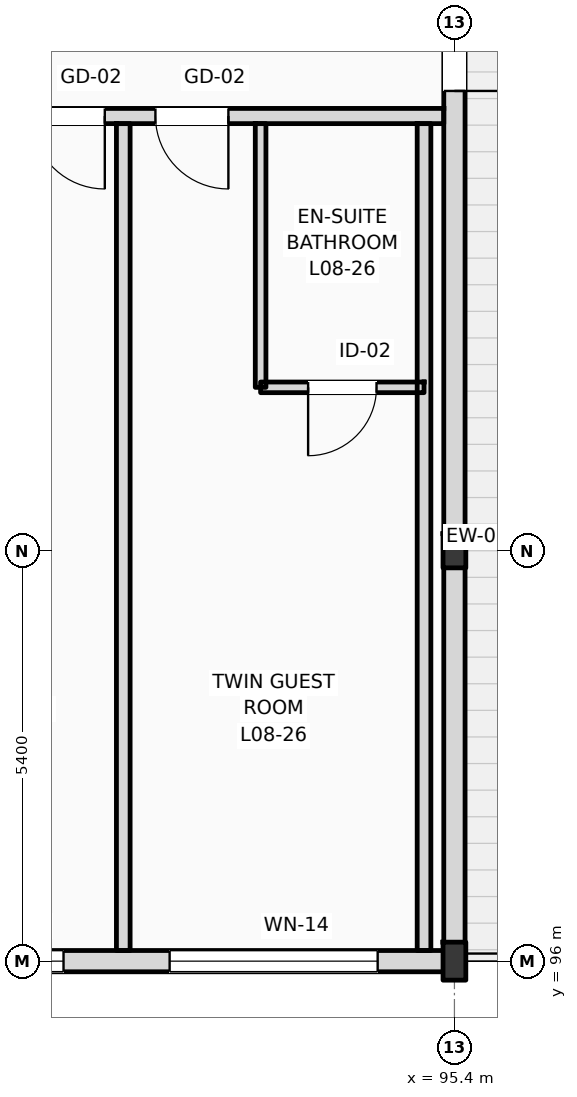
"""IFC4 building model, lengths in metres.
Left out: names, types, materials, properties, quantities, classifications, styles, units other than length and angle.
Written with IfcOpenShell. Run it as: python <this file> out.ifc"""

import sys

from ifc_helpers import new_model, si_unit, direction, frame, frame_2d, origin, origin_2d, place, context, subcontext, project, spatial, rectangle, i_section, extrude, element, fill, save


model = new_model("IFC4")
c1 = context("Model", 3, precision=1e-05, world=origin(), true_north=direction((0.0, 1.0)))
c2 = subcontext(c1, "Body", "Model", "MODEL_VIEW")
j1 = project(units=[si_unit("LENGTHUNIT", "METRE"), si_unit("PLANEANGLEUNIT", "RADIAN")], contexts=[c1])
p1 = place(None, origin())
s1 = spatial("IfcSite", under=j1, at=p1, CompositionType="ELEMENT")
p2 = place(p1, origin())
s2 = spatial("IfcBuilding", under=s1, at=p2, CompositionType="ELEMENT")
p3 = place(p2, frame((0.0, 0.0, 35.4)))
s3 = spatial("IfcBuildingStorey", under=s2, at=p3, CompositionType="ELEMENT", Elevation=35.4)
p4 = place(p3, frame((95.4, 96.0, 0.0), z_axis=(0.0, 0.0, 1.0), x_axis=(1.0, 0.0, 0.0)))
e1 = element("IfcColumn", 1, at=p4, inside=s3, PredefinedType="COLUMN", context=c2, shape_type="SweptSolid", body=[
    extrude(i_section(OverallWidth=0.3, OverallDepth=0.5, WebThickness=0.014, FlangeThickness=0.028, FilletRadius=0.027, at=origin_2d()), origin(), (0.0, 0.0, 1.0), 3.6),
])
p5 = place(p3, frame((95.4, 101.4, 0.0), z_axis=(0.0, 0.0, 1.0), x_axis=(1.0, 0.0, 0.0)))
e2 = element("IfcColumn", 2, at=p5, inside=s3, PredefinedType="COLUMN", context=c2, shape_type="SweptSolid", body=[
    extrude(i_section(OverallWidth=0.3, OverallDepth=0.45, WebThickness=0.014, FlangeThickness=0.026, FilletRadius=0.027, at=origin_2d()), origin(), (0.0, 0.0, 1.0), 3.6),
])
p6 = place(p3, frame((95.4, 96.0, 0.0), z_axis=(0.0, 0.0, 1.0), x_axis=(0.0, 1.0, 0.0)))
e3 = element("IfcWall", 3, at=p6, inside=s3, PredefinedType="STANDARD", context=c2, shape_type="SweptSolid", body=[
    extrude(rectangle(XDim=22.0, YDim=0.28, at=frame_2d((11.0, 0.0))), origin(), (0.0, 0.0, 1.0), 3.01),
])
p7 = place(p6, frame((11.45, 0.0, 0.0)))
e4 = element("IfcOpeningElement", 4, at=p7, cuts=e3, PredefinedType="OPENING", context=c2, shape_type="SweptSolid", body=[
    extrude(rectangle(XDim=1.8, YDim=2.4, at=frame_2d((0.9, 1.2))), frame((0.0, 0.15, 0.0), z_axis=(0.0, -1.0, 0.0), x_axis=(1.0, 0.0, 0.0)), (0.0, 0.0, 1.0), 0.3),
])
p8 = place(p3, frame((25.2, 96.0, 0.0), z_axis=(0.0, 0.0, 1.0), x_axis=(1.0, 0.0, 0.0)))
e5 = element("IfcWall", 5, at=p8, inside=s3, PredefinedType="STANDARD", context=c2, shape_type="SweptSolid", body=[
    extrude(rectangle(XDim=70.2, YDim=0.28, at=frame_2d((35.1, 0.0))), origin(), (0.0, 0.0, 1.0), 2.92),
])
p9 = place(p8, frame((16.694, 0.0, 0.9)))
e6 = element("IfcOpeningElement", 6, at=p9, cuts=e5, PredefinedType="OPENING", context=c2, shape_type="SweptSolid", body=[
    extrude(rectangle(XDim=1.8, YDim=1.84, at=frame_2d((0.9, 0.92))), frame((0.0, 0.15, 0.0), z_axis=(0.0, -1.0, 0.0), x_axis=(1.0, 0.0, 0.0)), (0.0, 0.0, 1.0), 0.3),
])
p10 = place(p8, frame((20.482, 0.0, 0.9)))
e7 = element("IfcOpeningElement", 7, at=p10, cuts=e5, PredefinedType="OPENING", context=c2, shape_type="SweptSolid", body=[
    extrude(rectangle(XDim=1.95, YDim=1.84, at=frame_2d((0.975, 0.92))), frame((0.0, 0.15, 0.0), z_axis=(0.0, -1.0, 0.0), x_axis=(1.0, 0.0, 0.0)), (0.0, 0.0, 1.0), 0.3),
])
p11 = place(p8, frame((24.316, 0.0, 0.9)))
e8 = element("IfcOpeningElement", 8, at=p11, cuts=e5, PredefinedType="OPENING", context=c2, shape_type="SweptSolid", body=[
    extrude(rectangle(XDim=2.1, YDim=1.84, at=frame_2d((1.05, 0.92))), frame((0.0, 0.15, 0.0), z_axis=(0.0, -1.0, 0.0), x_axis=(1.0, 0.0, 0.0)), (0.0, 0.0, 1.0), 0.3),
])
p12 = place(p8, frame((28.149, 0.0, 0.9)))
e9 = element("IfcOpeningElement", 9, at=p12, cuts=e5, PredefinedType="OPENING", context=c2, shape_type="SweptSolid", body=[
    extrude(rectangle(XDim=2.25, YDim=1.84, at=frame_2d((1.125, 0.92))), frame((0.0, 0.15, 0.0), z_axis=(0.0, -1.0, 0.0), x_axis=(1.0, 0.0, 0.0)), (0.0, 0.0, 1.0), 0.3),
])
p13 = place(p8, frame((31.983, 0.0, 0.9)))
e10 = element("IfcOpeningElement", 10, at=p13, cuts=e5, PredefinedType="OPENING", context=c2, shape_type="SweptSolid", body=[
    extrude(rectangle(XDim=2.4, YDim=1.84, at=frame_2d((1.2, 0.92))), frame((0.0, 0.15, 0.0), z_axis=(0.0, -1.0, 0.0), x_axis=(1.0, 0.0, 0.0)), (0.0, 0.0, 1.0), 0.3),
])
p14 = place(p8, frame((35.682, 0.0, 0.9)))
e11 = element("IfcOpeningElement", 11, at=p14, cuts=e5, PredefinedType="OPENING", context=c2, shape_type="SweptSolid", body=[
    extrude(rectangle(XDim=2.508, YDim=1.84, at=frame_2d((1.254, 0.92))), frame((0.0, 0.15, 0.0), z_axis=(0.0, -1.0, 0.0), x_axis=(1.0, 0.0, 0.0)), (0.0, 0.0, 1.0), 0.3),
])
p15 = place(p8, frame((55.56, 0.0, 0.9)))
e12 = element("IfcOpeningElement", 12, at=p15, cuts=e5, PredefinedType="OPENING", context=c2, shape_type="SweptSolid", body=[
    extrude(rectangle(XDim=1.8, YDim=1.84, at=frame_2d((0.9, 0.92))), frame((0.0, 0.15, 0.0), z_axis=(0.0, -1.0, 0.0), x_axis=(1.0, 0.0, 0.0)), (0.0, 0.0, 1.0), 0.3),
])
p16 = place(p8, frame((58.628, 0.0, 0.9)))
e13 = element("IfcOpeningElement", 13, at=p16, cuts=e5, PredefinedType="OPENING", context=c2, shape_type="SweptSolid", body=[
    extrude(rectangle(XDim=2.809, YDim=1.84, at=frame_2d((1.405, 0.92))), frame((0.0, 0.15, 0.0), z_axis=(0.0, -1.0, 0.0), x_axis=(1.0, 0.0, 0.0)), (0.0, 0.0, 1.0), 0.3),
])
p17 = place(p8, frame((63.257, 0.0, 0.9)))
e14 = element("IfcOpeningElement", 14, at=p17, cuts=e5, PredefinedType="OPENING", context=c2, shape_type="SweptSolid", body=[
    extrude(rectangle(XDim=1.8, YDim=1.84, at=frame_2d((0.9, 0.92))), frame((0.0, 0.15, 0.0), z_axis=(0.0, -1.0, 0.0), x_axis=(1.0, 0.0, 0.0)), (0.0, 0.0, 1.0), 0.3),
])
p18 = place(p8, frame((66.453, 0.0, 0.9)))
e15 = element("IfcOpeningElement", 15, at=p18, cuts=e5, PredefinedType="OPENING", context=c2, shape_type="SweptSolid", body=[
    extrude(rectangle(XDim=2.737, YDim=1.84, at=frame_2d((1.369, 0.92))), frame((0.0, 0.15, 0.0), z_axis=(0.0, -1.0, 0.0), x_axis=(1.0, 0.0, 0.0)), (0.0, 0.0, 1.0), 0.3),
])
p19 = place(p3, frame((79.76, 107.12, 0.0), z_axis=(0.0, 0.0, 1.0), x_axis=(1.0, 0.0, 0.0)))
e16 = element("IfcWall", 16, at=p19, inside=s3, PredefinedType="PARTITIONING", context=c2, shape_type="SweptSolid", body=[
    extrude(rectangle(XDim=15.5, YDim=0.2, at=frame_2d((7.75, 0.0))), origin(), (0.0, 0.0, 1.0), 3.38),
])
p20 = place(p19, frame((2.419, 0.0, 0.0)))
e17 = element("IfcOpeningElement", 17, at=p20, cuts=e16, PredefinedType="OPENING", context=c2, shape_type="SweptSolid", body=[
    extrude(rectangle(XDim=0.96, YDim=2.2, at=frame_2d((0.48, 1.1))), frame((0.0, 0.11, 0.0), z_axis=(0.0, -1.0, 0.0), x_axis=(1.0, 0.0, 0.0)), (0.0, 0.0, 1.0), 0.22),
])
p21 = place(p19, frame((4.117, 0.0, 0.0)))
e18 = element("IfcOpeningElement", 18, at=p21, cuts=e16, PredefinedType="OPENING", context=c2, shape_type="SweptSolid", body=[
    extrude(rectangle(XDim=0.96, YDim=2.2, at=frame_2d((0.48, 1.1))), frame((0.0, 0.11, 0.0), z_axis=(0.0, -1.0, 0.0), x_axis=(1.0, 0.0, 0.0)), (0.0, 0.0, 1.0), 0.22),
])
p22 = place(p19, frame((10.08, 0.0, 0.0)))
e19 = element("IfcOpeningElement", 19, at=p22, cuts=e16, PredefinedType="OPENING", context=c2, shape_type="SweptSolid", body=[
    extrude(rectangle(XDim=0.96, YDim=2.2, at=frame_2d((0.48, 1.1))), frame((0.0, 0.11, 0.0), z_axis=(0.0, -1.0, 0.0), x_axis=(1.0, 0.0, 0.0)), (0.0, 0.0, 1.0), 0.22),
])
p23 = place(p19, frame((11.706, 0.0, 0.0)))
e20 = element("IfcOpeningElement", 20, at=p23, cuts=e16, PredefinedType="OPENING", context=c2, shape_type="SweptSolid", body=[
    extrude(rectangle(XDim=0.96, YDim=2.2, at=frame_2d((0.48, 1.1))), frame((0.0, 0.11, 0.0), z_axis=(0.0, -1.0, 0.0), x_axis=(1.0, 0.0, 0.0)), (0.0, 0.0, 1.0), 0.22),
])
for number, where, z_axis, x_axis in (
    (21, (91.043, 96.14, 0.0), (0.0, 0.0, 1.0), (0.0, 1.0, 0.0)),
    (22, (95.0, 96.14, 0.0), (0.0, 0.0, 1.0), (0.0, 1.0, 0.0)),
):
    element("IfcWall", number, at=place(p3, frame(where, z_axis=z_axis, x_axis=x_axis)), inside=s3, PredefinedType="PARTITIONING", context=c2, shape_type="SweptSolid", body=[
        extrude(rectangle(XDim=10.88, YDim=0.18, at=frame_2d((5.44, 0.0))), origin(), (0.0, 0.0, 1.0), 3.38),
    ])
p24 = place(p3, frame((92.85, 103.55, 0.0), z_axis=(0.0, 0.0, 1.0), x_axis=(0.0, 1.0, 0.0)))
e23 = element("IfcWall", 23, at=p24, inside=s3, PredefinedType="PARTITIONING", context=c2, shape_type="SweptSolid", body=[
    extrude(rectangle(XDim=3.47, YDim=0.14, at=frame_2d((1.735, 0.0))), origin(), (0.0, 0.0, 1.0), 3.07),
])
p25 = place(p3, frame((92.85, 103.55, 0.0), z_axis=(0.0, 0.0, 1.0), x_axis=(1.0, 0.0, 0.0)))
e24 = element("IfcWall", 24, at=p25, inside=s3, PredefinedType="PARTITIONING", context=c2, shape_type="SweptSolid", body=[
    extrude(rectangle(XDim=2.15, YDim=0.14, at=frame_2d((1.075, 0.0))), origin(), (0.0, 0.0, 1.0), 3.38),
])
p26 = place(p25, frame((0.625, 0.0, 0.0)))
e25 = element("IfcOpeningElement", 25, at=p26, cuts=e24, PredefinedType="OPENING", context=c2, shape_type="SweptSolid", body=[
    extrude(rectangle(XDim=0.9, YDim=2.1, at=frame_2d((0.45, 1.05))), frame((0.0, 0.08, 0.0), z_axis=(0.0, -1.0, 0.0), x_axis=(1.0, 0.0, 0.0)), (0.0, 0.0, 1.0), 0.16),
])
p27 = place(p7, frame((1.8, 0.0, 0.0), z_axis=(0.0, 0.0, 1.0), x_axis=(-1.0, 0.0, 0.0)))
e26 = element("IfcDoor", 26, at=p27, inside=s3, OperationType="DOUBLE_SWING_LEFT", PredefinedType="DOOR", context=c2, shape_type="SweptSolid", body=[
    extrude(rectangle(XDim=1.8, YDim=2.4, at=frame_2d((0.9, 1.2))), frame((0.0, 0.025, 0.0), z_axis=(0.0, -1.0, 0.0), x_axis=(1.0, 0.0, 0.0)), (0.0, 0.0, 1.0), 0.05),
])
fill(e4, e26)
p28 = place(p17, origin())
e27 = element("IfcWindow", 27, at=p28, inside=s3, PartitioningType="DOUBLE_PANEL_VERTICAL", PredefinedType="WINDOW", context=c2, shape_type="SweptSolid", body=[
    extrude(rectangle(XDim=1.8, YDim=1.84, at=frame_2d((0.9, 0.92))), frame((0.0, 0.03, 0.0), z_axis=(0.0, -1.0, 0.0), x_axis=(1.0, 0.0, 0.0)), (0.0, 0.0, 1.0), 0.06),
])
fill(e14, e27)
p29 = place(p18, origin())
e28 = element("IfcWindow", 28, at=p29, inside=s3, PartitioningType="DOUBLE_PANEL_VERTICAL", PredefinedType="WINDOW", context=c2, shape_type="SweptSolid", body=[
    extrude(rectangle(XDim=2.737, YDim=1.84, at=frame_2d((1.369, 0.92))), frame((0.0, 0.03, 0.0), z_axis=(0.0, -1.0, 0.0), x_axis=(1.0, 0.0, 0.0)), (0.0, 0.0, 1.0), 0.06),
])
fill(e15, e28)
p30 = place(p22, frame((0.96, 0.0, 0.0), z_axis=(0.0, 0.0, 1.0), x_axis=(-1.0, 0.0, 0.0)))
e29 = element("IfcDoor", 29, at=p30, inside=s3, OperationType="SINGLE_SWING_RIGHT", PredefinedType="DOOR", context=c2, shape_type="SweptSolid", body=[
    extrude(rectangle(XDim=0.96, YDim=2.2, at=frame_2d((0.48, 1.1))), frame((0.0, 0.025, 0.0), z_axis=(0.0, -1.0, 0.0), x_axis=(1.0, 0.0, 0.0)), (0.0, 0.0, 1.0), 0.05),
])
fill(e19, e29)
p31 = place(p23, frame((0.96, 0.0, 0.0), z_axis=(0.0, 0.0, 1.0), x_axis=(-1.0, 0.0, 0.0)))
e30 = element("IfcDoor", 30, at=p31, inside=s3, OperationType="SINGLE_SWING_RIGHT", PredefinedType="DOOR", context=c2, shape_type="SweptSolid", body=[
    extrude(rectangle(XDim=0.96, YDim=2.2, at=frame_2d((0.48, 1.1))), frame((0.0, 0.025, 0.0), z_axis=(0.0, -1.0, 0.0), x_axis=(1.0, 0.0, 0.0)), (0.0, 0.0, 1.0), 0.05),
])
fill(e20, e30)
p32 = place(p26, frame((0.9, 0.0, 0.0), z_axis=(0.0, 0.0, 1.0), x_axis=(-1.0, 0.0, 0.0)))
e31 = element("IfcDoor", 31, at=p32, inside=s3, OperationType="SINGLE_SWING_LEFT", PredefinedType="DOOR", context=c2, shape_type="SweptSolid", body=[
    extrude(rectangle(XDim=0.9, YDim=2.1, at=frame_2d((0.45, 1.05))), frame((0.0, 0.025, 0.0), z_axis=(0.0, -1.0, 0.0), x_axis=(1.0, 0.0, 0.0)), (0.0, 0.0, 1.0), 0.05),
])
fill(e25, e31)
save(model, sys.argv[1])
